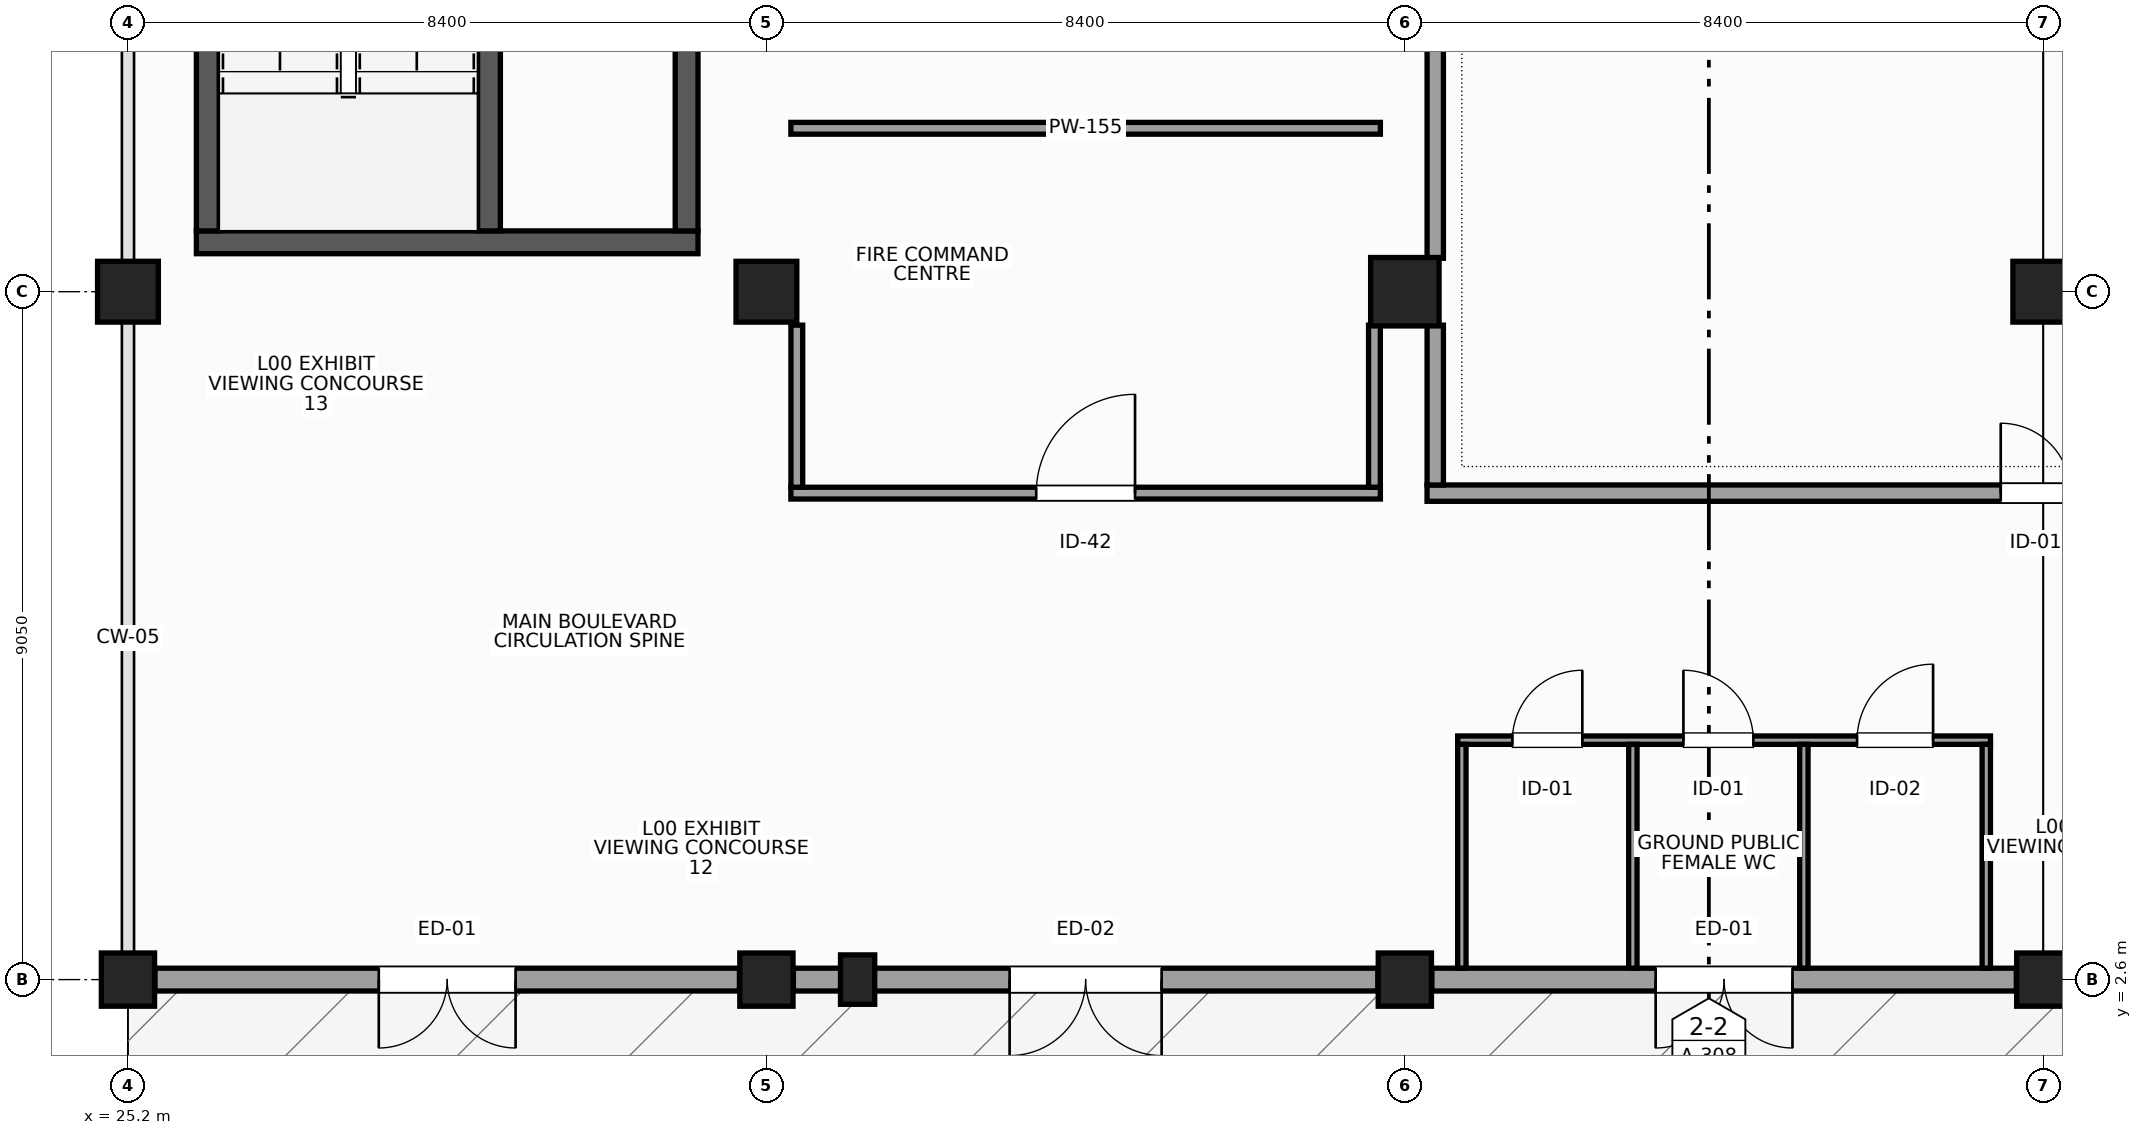
"""IFC4 building model, lengths in metres.
Left out: names, types, materials, properties, quantities, classifications, styles, units other than length and angle.
Written with IfcOpenShell. Run it as: python <this file> out.ifc"""

import sys

from ifc_helpers import new_model, si_unit, direction, frame, frame_2d, origin, origin_2d, place, context, subcontext, project, spatial, rectangle, extrude, element, fill, save


model = new_model("IFC4")
c1 = context("Model", 3, precision=1e-05, world=origin(), true_north=direction((0.0, 1.0)))
c2 = subcontext(c1, "Body", "Model", "MODEL_VIEW")
j1 = project(units=[si_unit("LENGTHUNIT", "METRE"), si_unit("PLANEANGLEUNIT", "RADIAN")], contexts=[c1])
p1 = place(None, origin())
s1 = spatial("IfcSite", under=j1, at=p1, CompositionType="ELEMENT")
p2 = place(p1, origin())
s2 = spatial("IfcBuilding", under=s1, at=p2, CompositionType="ELEMENT")
p3 = place(p2, origin())
s3 = spatial("IfcBuildingStorey", under=s2, at=p3, CompositionType="ELEMENT", Elevation=0.0)
p4 = place(p3, frame((25.2, 2.6, 0.0), z_axis=(0.0, 0.0, 1.0), x_axis=(1.0, 0.0, 0.0)))
e1 = element("IfcColumn", 1, at=p4, inside=s3, PredefinedType="COLUMN", context=c2, shape_type="SweptSolid", body=[
    extrude(rectangle(XDim=0.7, YDim=0.7, at=origin_2d()), origin(), (0.0, 0.0, 1.0), 5.4),
])
p5 = place(p3, frame((25.2, 11.65, 0.0), z_axis=(0.0, 0.0, 1.0), x_axis=(1.0, 0.0, 0.0)))
e2 = element("IfcColumn", 2, at=p5, inside=s3, PredefinedType="COLUMN", context=c2, shape_type="SweptSolid", body=[
    extrude(rectangle(XDim=0.8, YDim=0.8, at=origin_2d()), origin(), (0.0, 0.0, 1.0), 5.4),
])
p6 = place(p3, frame((33.6, 2.6, 0.0), z_axis=(0.0, 0.0, 1.0), x_axis=(1.0, 0.0, 0.0)))
e3 = element("IfcColumn", 3, at=p6, inside=s3, PredefinedType="COLUMN", context=c2, shape_type="SweptSolid", body=[
    extrude(rectangle(XDim=0.7, YDim=0.7, at=origin_2d()), origin(), (0.0, 0.0, 1.0), 5.4),
])
p7 = place(p3, frame((33.6, 11.65, 0.0), z_axis=(0.0, 0.0, 1.0), x_axis=(1.0, 0.0, 0.0)))
e4 = element("IfcColumn", 4, at=p7, inside=s3, PredefinedType="COLUMN", context=c2, shape_type="SweptSolid", body=[
    extrude(rectangle(XDim=0.8, YDim=0.8, at=origin_2d()), origin(), (0.0, 0.0, 1.0), 5.4),
])
p8 = place(p3, frame((42.0, 2.6, 0.0), z_axis=(0.0, 0.0, 1.0), x_axis=(1.0, 0.0, 0.0)))
e5 = element("IfcColumn", 5, at=p8, inside=s3, PredefinedType="COLUMN", context=c2, shape_type="SweptSolid", body=[
    extrude(rectangle(XDim=0.7, YDim=0.7, at=origin_2d()), origin(), (0.0, 0.0, 1.0), 5.4),
])
p9 = place(p3, frame((42.0, 11.65, 0.0), z_axis=(0.0, 0.0, 1.0), x_axis=(1.0, 0.0, 0.0)))
e6 = element("IfcColumn", 6, at=p9, inside=s3, PredefinedType="COLUMN", context=c2, shape_type="SweptSolid", body=[
    extrude(rectangle(XDim=0.9, YDim=0.9, at=origin_2d()), origin(), (0.0, 0.0, 1.0), 5.4),
])
p10 = place(p3, frame((50.4, 2.6, 0.0), z_axis=(0.0, 0.0, 1.0), x_axis=(1.0, 0.0, 0.0)))
e7 = element("IfcColumn", 7, at=p10, inside=s3, PredefinedType="COLUMN", context=c2, shape_type="SweptSolid", body=[
    extrude(rectangle(XDim=0.7, YDim=0.7, at=origin_2d()), origin(), (0.0, 0.0, 1.0), 5.4),
])
p11 = place(p3, frame((50.4, 11.65, 0.0), z_axis=(0.0, 0.0, 1.0), x_axis=(1.0, 0.0, 0.0)))
e8 = element("IfcColumn", 8, at=p11, inside=s3, PredefinedType="COLUMN", context=c2, shape_type="SweptSolid", body=[
    extrude(rectangle(XDim=0.8, YDim=0.8, at=origin_2d()), origin(), (0.0, 0.0, 1.0), 5.4),
])
p12 = place(p3, frame((34.8, 2.6, 0.0), z_axis=(0.0, 0.0, 1.0), x_axis=(1.0, 0.0, 0.0)))
e9 = element("IfcColumn", 9, at=p12, inside=s3, PredefinedType="PILASTER", context=c2, shape_type="SweptSolid", body=[
    extrude(rectangle(XDim=0.45, YDim=0.65, at=origin_2d()), origin(), (0.0, 0.0, 1.0), 5.1),
])
p13 = place(p3, frame((25.555, 2.6, 0.0), z_axis=(0.0, 0.0, 1.0), x_axis=(1.0, 0.0, 0.0)))
e10 = element("IfcWall", 10, at=p13, inside=s3, PredefinedType="STANDARD", context=c2, shape_type="SweptSolid", body=[
    extrude(rectangle(XDim=7.69, YDim=0.3, at=frame_2d((3.845, 0.0))), origin(), (0.0, 0.0, 1.0), 3.65),
])
p14 = place(p13, frame((2.945, 0.0, 0.0)))
e11 = element("IfcOpeningElement", 11, at=p14, cuts=e10, PredefinedType="OPENING", context=c2, shape_type="SweptSolid", body=[
    extrude(rectangle(XDim=1.8, YDim=2.4, at=frame_2d((0.9, 1.2))), frame((0.0, 0.16, 0.0), z_axis=(0.0, -1.0, 0.0), x_axis=(1.0, 0.0, 0.0)), (0.0, 0.0, 1.0), 0.32),
])
p15 = place(p3, frame((33.955, 2.6, 0.0), z_axis=(0.0, 0.0, 1.0), x_axis=(1.0, 0.0, 0.0)))
e12 = element("IfcWall", 12, at=p15, inside=s3, PredefinedType="STANDARD", context=c2, shape_type="SweptSolid", body=[
    extrude(rectangle(XDim=7.69, YDim=0.3, at=frame_2d((3.845, 0.0))), origin(), (0.0, 0.0, 1.0), 3.65),
])
p16 = place(p15, frame((2.845, 0.0, 0.0)))
e13 = element("IfcOpeningElement", 13, at=p16, cuts=e12, PredefinedType="OPENING", context=c2, shape_type="SweptSolid", body=[
    extrude(rectangle(XDim=2.0, YDim=2.4, at=frame_2d((1.0, 1.2))), frame((0.0, 0.16, 0.0), z_axis=(0.0, -1.0, 0.0), x_axis=(1.0, 0.0, 0.0)), (0.0, 0.0, 1.0), 0.32),
])
p17 = place(p3, frame((42.355, 2.6, 0.0), z_axis=(0.0, 0.0, 1.0), x_axis=(1.0, 0.0, 0.0)))
e14 = element("IfcWall", 14, at=p17, inside=s3, PredefinedType="STANDARD", context=c2, shape_type="SweptSolid", body=[
    extrude(rectangle(XDim=7.69, YDim=0.3, at=frame_2d((3.845, 0.0))), origin(), (0.0, 0.0, 1.0), 3.65),
])
p18 = place(p17, frame((2.945, 0.0, 0.0)))
e15 = element("IfcOpeningElement", 15, at=p18, cuts=e14, PredefinedType="OPENING", context=c2, shape_type="SweptSolid", body=[
    extrude(rectangle(XDim=1.8, YDim=2.4, at=frame_2d((0.9, 1.2))), frame((0.0, 0.16, 0.0), z_axis=(0.0, -1.0, 0.0), x_axis=(1.0, 0.0, 0.0)), (0.0, 0.0, 1.0), 0.32),
])
p19 = place(p3, frame((26.1, 12.3, 0.0), z_axis=(0.0, 0.0, 1.0), x_axis=(1.0, 0.0, 0.0)))
e16 = element("IfcWall", 16, at=p19, inside=s3, PredefinedType="SHEAR", context=c2, shape_type="SweptSolid", body=[
    extrude(rectangle(XDim=6.6, YDim=0.3, at=frame_2d((3.3, 0.0))), origin(), (0.0, 0.0, 1.0), 5.09),
])
for number, where, z_axis, x_axis in (
    (17, (26.25, 12.45, 0.0), (0.0, 0.0, 1.0), (0.0, 1.0, 0.0)),
    (18, (32.55, 12.45, 0.0), (0.0, 0.0, 1.0), (0.0, 1.0, 0.0)),
    (19, (29.95, 12.45, 0.0), (0.0, 0.0, 1.0), (0.0, 1.0, 0.0)),
):
    element("IfcWall", number, at=place(p3, frame(where, z_axis=z_axis, x_axis=x_axis)), inside=s3, PredefinedType="SHEAR", context=c2, shape_type="SweptSolid", body=[
        extrude(rectangle(XDim=7.4, YDim=0.3, at=frame_2d((3.7, 0.0))), origin(), (0.0, 0.0, 1.0), 5.09),
    ])
p20 = place(p3, frame((42.695, 5.75, 0.0), z_axis=(0.0, 0.0, 1.0), x_axis=(1.0, 0.0, 0.0)))
e20 = element("IfcWall", 20, at=p20, inside=s3, PredefinedType="PARTITIONING", context=c2, shape_type="SweptSolid", body=[
    extrude(rectangle(XDim=7.01, YDim=0.11, at=frame_2d((3.505, 0.0))), origin(), (0.0, 0.0, 1.0), 3.65),
])
p21 = place(p20, frame((0.72, 0.0, 0.0)))
e21 = element("IfcOpeningElement", 21, at=p21, cuts=e20, PredefinedType="OPENING", context=c2, shape_type="SweptSolid", body=[
    extrude(rectangle(XDim=0.92, YDim=2.1, at=frame_2d((0.46, 1.05))), frame((0.0, 0.065, 0.0), z_axis=(0.0, -1.0, 0.0), x_axis=(1.0, 0.0, 0.0)), (0.0, 0.0, 1.0), 0.13),
])
p22 = place(p20, frame((2.97, 0.0, 0.0)))
e22 = element("IfcOpeningElement", 22, at=p22, cuts=e20, PredefinedType="OPENING", context=c2, shape_type="SweptSolid", body=[
    extrude(rectangle(XDim=0.92, YDim=2.1, at=frame_2d((0.46, 1.05))), frame((0.0, 0.065, 0.0), z_axis=(0.0, -1.0, 0.0), x_axis=(1.0, 0.0, 0.0)), (0.0, 0.0, 1.0), 0.13),
])
p23 = place(p20, frame((5.255, 0.0, 0.0)))
e23 = element("IfcOpeningElement", 23, at=p23, cuts=e20, PredefinedType="OPENING", context=c2, shape_type="SweptSolid", body=[
    extrude(rectangle(XDim=1.0, YDim=2.15, at=frame_2d((0.5, 1.075))), frame((0.0, 0.065, 0.0), z_axis=(0.0, -1.0, 0.0), x_axis=(1.0, 0.0, 0.0)), (0.0, 0.0, 1.0), 0.13),
])
for number, where, z_axis, x_axis in (
    (24, (42.75, 2.75, 0.0), (0.0, 0.0, 1.0), (0.0, 1.0, 0.0)),
    (25, (45.0, 2.75, 0.0), (0.0, 0.0, 1.0), (0.0, 1.0, 0.0)),
    (26, (47.25, 2.75, 0.0), (0.0, 0.0, 1.0), (0.0, 1.0, 0.0)),
    (27, (49.65, 2.75, 0.0), (0.0, 0.0, 1.0), (0.0, 1.0, 0.0)),
):
    element("IfcWall", number, at=place(p3, frame(where, z_axis=z_axis, x_axis=x_axis)), inside=s3, PredefinedType="PARTITIONING", context=c2, shape_type="SweptSolid", body=[
        extrude(rectangle(XDim=2.945, YDim=0.11, at=frame_2d((1.473, 0.0))), origin(), (0.0, 0.0, 1.0), 3.65),
    ])
p24 = place(p3, frame((33.922, 9.0, 0.0), z_axis=(0.0, 0.0, 1.0), x_axis=(1.0, 0.0, 0.0)))
e28 = element("IfcWall", 28, at=p24, inside=s3, PredefinedType="PARTITIONING", context=c2, shape_type="SweptSolid", body=[
    extrude(rectangle(XDim=7.756, YDim=0.155, at=frame_2d((3.878, 0.0))), origin(), (0.0, 0.0, 1.0), 4.14),
])
p25 = place(p24, frame((3.228, 0.0, 0.0)))
e29 = element("IfcOpeningElement", 29, at=p25, cuts=e28, PredefinedType="OPENING", context=c2, shape_type="SweptSolid", body=[
    extrude(rectangle(XDim=1.3, YDim=2.38, at=frame_2d((0.65, 1.19))), frame((0.0, 0.087, 0.0), z_axis=(0.0, -1.0, 0.0), x_axis=(1.0, 0.0, 0.0)), (0.0, 0.0, 1.0), 0.175),
])
p26 = place(p3, frame((33.922, 13.8, 0.0), z_axis=(0.0, 0.0, 1.0), x_axis=(1.0, 0.0, 0.0)))
e30 = element("IfcWall", 30, at=p26, inside=s3, PredefinedType="PARTITIONING", context=c2, shape_type="SweptSolid", body=[
    extrude(rectangle(XDim=7.756, YDim=0.155, at=frame_2d((3.878, 0.0))), origin(), (0.0, 0.0, 1.0), 4.14),
])
for number, where, z_axis, x_axis in (
    (31, (41.6, 9.078, 0.0), (0.0, 0.0, 1.0), (0.0, 1.0, 0.0)),
    (32, (34.0, 9.078, 0.0), (0.0, 0.0, 1.0), (0.0, 1.0, 0.0)),
):
    element("IfcWall", number, at=place(p3, frame(where, z_axis=z_axis, x_axis=x_axis)), inside=s3, PredefinedType="PARTITIONING", context=c2, shape_type="SweptSolid", body=[
        extrude(rectangle(XDim=2.132, YDim=0.155, at=frame_2d((1.066, 0.0))), origin(), (0.0, 0.0, 1.0), 5.09),
    ])
p27 = place(p3, frame((42.292, 9.0, 0.0), z_axis=(0.0, 0.0, 1.0), x_axis=(1.0, 0.0, 0.0)))
e33 = element("IfcWall", 33, at=p27, inside=s3, PredefinedType="PARTITIONING", context=c2, shape_type="SweptSolid", body=[
    extrude(rectangle(XDim=16.016, YDim=0.215, at=frame_2d((8.008, 0.0))), origin(), (0.0, 0.0, 1.0), 4.14),
])
p28 = place(p27, frame((7.548, 0.0, 0.0)))
e34 = element("IfcOpeningElement", 34, at=p28, cuts=e33, PredefinedType="OPENING", context=c2, shape_type="SweptSolid", body=[
    extrude(rectangle(XDim=0.92, YDim=2.1, at=frame_2d((0.46, 1.05))), frame((0.0, 0.118, 0.0), z_axis=(0.0, -1.0, 0.0), x_axis=(1.0, 0.0, 0.0)), (0.0, 0.0, 1.0), 0.235),
])
p29 = place(p27, frame((9.068, 0.0, 1.05)))
e35 = element("IfcOpeningElement", 35, at=p29, cuts=e33, PredefinedType="OPENING", context=c2, shape_type="SweptSolid", body=[
    extrude(rectangle(XDim=2.1, YDim=1.3, at=frame_2d((1.05, 0.65))), frame((0.0, 0.118, 0.0), z_axis=(0.0, -1.0, 0.0), x_axis=(1.0, 0.0, 0.0)), (0.0, 0.0, 1.0), 0.235),
])
p30 = place(p3, frame((42.4, 9.107, 0.0), z_axis=(0.0, 0.0, 1.0), x_axis=(0.0, 1.0, 0.0)))
e36 = element("IfcWall", 36, at=p30, inside=s3, PredefinedType="PARTITIONING", context=c2, shape_type="SweptSolid", body=[
    extrude(rectangle(XDim=2.103, YDim=0.215, at=frame_2d((1.052, 0.0))), origin(), (0.0, 0.0, 1.0), 5.09),
])
p31 = place(p3, frame((42.4, 12.09, 0.0), z_axis=(0.0, 0.0, 1.0), x_axis=(0.0, 1.0, 0.0)))
e37 = element("IfcWall", 37, at=p31, inside=s3, PredefinedType="PARTITIONING", context=c2, shape_type="SweptSolid", body=[
    extrude(rectangle(XDim=8.17, YDim=0.215, at=frame_2d((4.085, 0.0))), origin(), (0.0, 0.0, 1.0), 4.54),
])
p32 = place(p14, frame((1.8, 0.0, 0.0), z_axis=(0.0, 0.0, 1.0), x_axis=(-1.0, 0.0, 0.0)))
e38 = element("IfcDoor", 38, at=p32, inside=s3, OperationType="DOUBLE_DOOR_SINGLE_SWING", PredefinedType="DOOR", context=c2, shape_type="SweptSolid", body=[
    extrude(rectangle(XDim=1.8, YDim=2.4, at=frame_2d((0.9, 1.2))), frame((0.0, 0.025, 0.0), z_axis=(0.0, -1.0, 0.0), x_axis=(1.0, 0.0, 0.0)), (0.0, 0.0, 1.0), 0.05),
])
fill(e11, e38)
p33 = place(p16, frame((2.0, 0.0, 0.0), z_axis=(0.0, 0.0, 1.0), x_axis=(-1.0, 0.0, 0.0)))
e39 = element("IfcDoor", 39, at=p33, inside=s3, OperationType="DOUBLE_DOOR_SINGLE_SWING", PredefinedType="DOOR", context=c2, shape_type="SweptSolid", body=[
    extrude(rectangle(XDim=2.0, YDim=2.4, at=frame_2d((1.0, 1.2))), frame((0.0, 0.025, 0.0), z_axis=(0.0, -1.0, 0.0), x_axis=(1.0, 0.0, 0.0)), (0.0, 0.0, 1.0), 0.05),
])
fill(e13, e39)
p34 = place(p18, frame((1.8, 0.0, 0.0), z_axis=(0.0, 0.0, 1.0), x_axis=(-1.0, 0.0, 0.0)))
e40 = element("IfcDoor", 40, at=p34, inside=s3, OperationType="DOUBLE_DOOR_SINGLE_SWING", PredefinedType="DOOR", context=c2, shape_type="SweptSolid", body=[
    extrude(rectangle(XDim=1.8, YDim=2.4, at=frame_2d((0.9, 1.2))), frame((0.0, 0.025, 0.0), z_axis=(0.0, -1.0, 0.0), x_axis=(1.0, 0.0, 0.0)), (0.0, 0.0, 1.0), 0.05),
])
fill(e15, e40)
p35 = place(p21, origin())
e41 = element("IfcDoor", 41, at=p35, inside=s3, OperationType="SINGLE_SWING_RIGHT", PredefinedType="DOOR", context=c2, shape_type="SweptSolid", body=[
    extrude(rectangle(XDim=0.92, YDim=2.1, at=frame_2d((0.46, 1.05))), frame((0.0, 0.025, 0.0), z_axis=(0.0, -1.0, 0.0), x_axis=(1.0, 0.0, 0.0)), (0.0, 0.0, 1.0), 0.05),
])
fill(e21, e41)
p36 = place(p22, origin())
e42 = element("IfcDoor", 42, at=p36, inside=s3, OperationType="SINGLE_SWING_LEFT", PredefinedType="DOOR", context=c2, shape_type="SweptSolid", body=[
    extrude(rectangle(XDim=0.92, YDim=2.1, at=frame_2d((0.46, 1.05))), frame((0.0, 0.025, 0.0), z_axis=(0.0, -1.0, 0.0), x_axis=(1.0, 0.0, 0.0)), (0.0, 0.0, 1.0), 0.05),
])
fill(e22, e42)
p37 = place(p23, origin())
e43 = element("IfcDoor", 43, at=p37, inside=s3, OperationType="SINGLE_SWING_RIGHT", PredefinedType="DOOR", context=c2, shape_type="SweptSolid", body=[
    extrude(rectangle(XDim=1.0, YDim=2.15, at=frame_2d((0.5, 1.075))), frame((0.0, 0.025, 0.0), z_axis=(0.0, -1.0, 0.0), x_axis=(1.0, 0.0, 0.0)), (0.0, 0.0, 1.0), 0.05),
])
fill(e23, e43)
p38 = place(p25, origin())
e44 = element("IfcDoor", 44, at=p38, inside=s3, OperationType="SINGLE_SWING_RIGHT", PredefinedType="DOOR", context=c2, shape_type="SweptSolid", body=[
    extrude(rectangle(XDim=1.3, YDim=2.38, at=frame_2d((0.65, 1.19))), frame((0.0, 0.025, 0.0), z_axis=(0.0, -1.0, 0.0), x_axis=(1.0, 0.0, 0.0)), (0.0, 0.0, 1.0), 0.05),
])
fill(e29, e44)
p39 = place(p28, origin())
e45 = element("IfcDoor", 45, at=p39, inside=s3, OperationType="SINGLE_SWING_LEFT", PredefinedType="DOOR", context=c2, shape_type="SweptSolid", body=[
    extrude(rectangle(XDim=0.92, YDim=2.1, at=frame_2d((0.46, 1.05))), frame((0.0, 0.025, 0.0), z_axis=(0.0, -1.0, 0.0), x_axis=(1.0, 0.0, 0.0)), (0.0, 0.0, 1.0), 0.05),
])
fill(e34, e45)
save(model, sys.argv[1])
